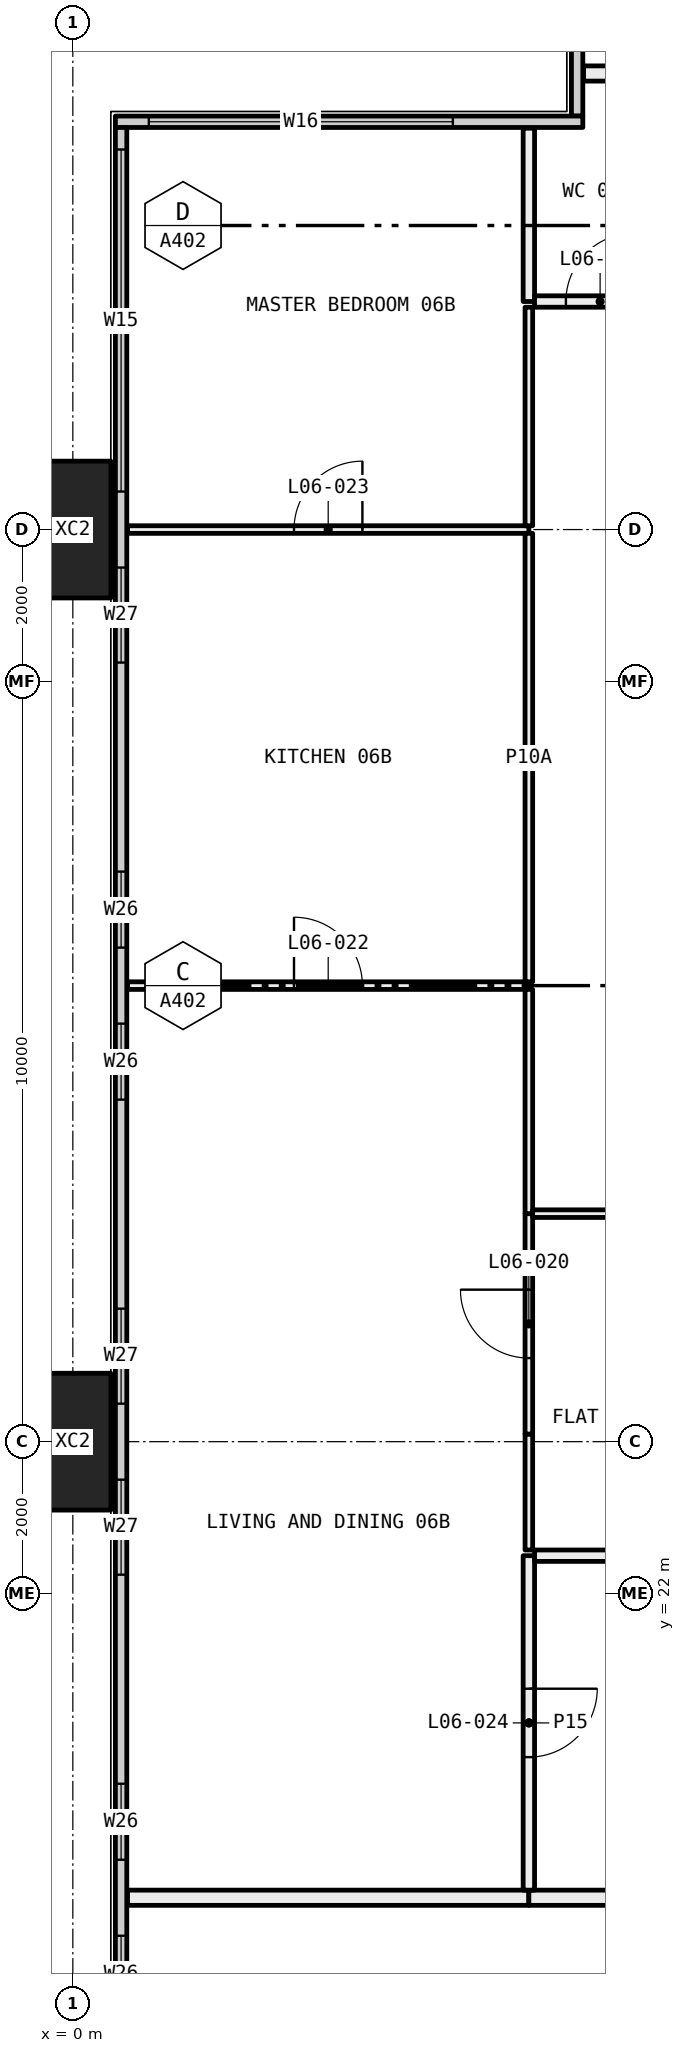
"""IFC4 building model, lengths in metres.
Left out: names, types, materials, properties, quantities, classifications, styles, units other than length and angle.
Written with IfcOpenShell. Run it as: python <this file> out.ifc"""

import sys

from ifc_helpers import new_model, si_unit, direction, frame, frame_2d, origin, origin_2d, place, context, subcontext, project, spatial, rectangle, hollow_rectangle, extrude, element, fill, save


model = new_model("IFC4")
c1 = context("Model", 3, precision=1e-05, world=origin(), true_north=direction((0.0, 1.0)))
c2 = subcontext(c1, "Body", "Model", "MODEL_VIEW")
j1 = project(units=[si_unit("LENGTHUNIT", "METRE"), si_unit("PLANEANGLEUNIT", "RADIAN")], contexts=[c1])
p1 = place(None, origin())
s1 = spatial("IfcSite", under=j1, at=p1, CompositionType="ELEMENT")
p2 = place(p1, origin())
s2 = spatial("IfcBuilding", under=s1, at=p2, CompositionType="ELEMENT")
p3 = place(p2, frame((0.0, 0.0, 33.45)))
s3 = spatial("IfcBuildingStorey", under=s2, at=p3, CompositionType="ELEMENT", Elevation=33.45)
for number, where, z_axis, x_axis in (
    (1, (0.0, 24.0, -0.4), (0.0, 0.0, 1.0), (0.0, 1.0, 0.0)),
    (2, (0.0, 36.0, -0.4), (0.0, 0.0, 1.0), (0.0, 1.0, 0.0)),
):
    element("IfcColumn", number, at=place(p3, frame(where, z_axis=z_axis, x_axis=x_axis)), inside=s3, PredefinedType="COLUMN", context=c2, shape_type="SweptSolid", body=[
        extrude(hollow_rectangle(XDim=1.8, YDim=1.0, WallThickness=0.07, at=origin_2d()), origin(), (0.0, 0.0, 1.0), 3.45),
    ])
p4 = place(p3, frame((6.635, 41.44, 0.0), z_axis=(0.0, 0.0, 1.0), x_axis=(0.0, 1.0, 0.0)))
e3 = element("IfcWall", 3, at=p4, inside=s3, PredefinedType="ELEMENTEDWALL", context=c2, shape_type="SweptSolid", body=[
    extrude(rectangle(XDim=5.85, YDim=0.15, at=frame_2d((2.925, 0.0))), origin(), (0.0, 0.0, 1.0), 3.05),
])
p5 = place(p4, frame((1.56, 0.0, 0.45)))
e4 = element("IfcOpeningElement", 4, at=p5, cuts=e3, PredefinedType="OPENING", context=c2, shape_type="SweptSolid", body=[
    extrude(rectangle(XDim=4.0, YDim=2.55, at=frame_2d((2.0, 1.275))), frame((0.0, 0.085, 0.0), z_axis=(0.0, -1.0, 0.0), x_axis=(1.0, 0.0, 0.0)), (0.0, 0.0, 1.0), 0.17),
])
p6 = place(p3, frame((0.56, 41.365, 0.0), z_axis=(0.0, 0.0, 1.0), x_axis=(1.0, 0.0, 0.0)))
e5 = element("IfcWall", 5, at=p6, inside=s3, PredefinedType="ELEMENTEDWALL", context=c2, shape_type="SweptSolid", body=[
    extrude(rectangle(XDim=6.15, YDim=0.15, at=frame_2d((3.075, 0.0))), origin(), (0.0, 0.0, 1.0), 3.05),
])
p7 = place(p6, frame((0.44, 0.0, 0.45)))
e6 = element("IfcOpeningElement", 6, at=p7, cuts=e5, PredefinedType="OPENING", context=c2, shape_type="SweptSolid", body=[
    extrude(rectangle(XDim=4.0, YDim=2.55, at=frame_2d((2.0, 1.275))), frame((0.0, 0.085, 0.0), z_axis=(0.0, -1.0, 0.0), x_axis=(1.0, 0.0, 0.0)), (0.0, 0.0, 1.0), 0.17),
])
p8 = place(p3, frame((0.635, 6.71, 0.0), z_axis=(0.0, 0.0, 1.0), x_axis=(0.0, 1.0, 0.0)))
e7 = element("IfcWall", 7, at=p8, inside=s3, PredefinedType="ELEMENTEDWALL", context=c2, shape_type="SweptSolid", body=[
    extrude(rectangle(XDim=34.58, YDim=0.15, at=frame_2d((17.29, 0.0))), origin(), (0.0, 0.0, 1.0), 3.05),
])
p9 = place(p8, frame((0.29, 0.0, 0.45)))
e8 = element("IfcOpeningElement", 8, at=p9, cuts=e7, PredefinedType="OPENING", context=c2, shape_type="SweptSolid", body=[
    extrude(rectangle(XDim=4.5, YDim=2.55, at=frame_2d((2.25, 1.275))), frame((0.0, 0.085, 0.0), z_axis=(0.0, -1.0, 0.0), x_axis=(1.0, 0.0, 0.0)), (0.0, 0.0, 1.0), 0.17),
])
p10 = place(p8, frame((5.79, 0.0, 0.45)))
e9 = element("IfcOpeningElement", 9, at=p10, cuts=e7, PredefinedType="OPENING", context=c2, shape_type="SweptSolid", body=[
    extrude(rectangle(XDim=1.25, YDim=2.55, at=frame_2d((0.625, 1.275))), frame((0.0, 0.085, 0.0), z_axis=(0.0, -1.0, 0.0), x_axis=(1.0, 0.0, 0.0)), (0.0, 0.0, 1.0), 0.17),
])
p11 = place(p8, frame((9.79, 0.0, 0.45)))
e10 = element("IfcOpeningElement", 10, at=p11, cuts=e7, PredefinedType="OPENING", context=c2, shape_type="SweptSolid", body=[
    extrude(rectangle(XDim=1.0, YDim=2.55, at=frame_2d((0.5, 1.275))), frame((0.0, 0.085, 0.0), z_axis=(0.0, -1.0, 0.0), x_axis=(1.0, 0.0, 0.0)), (0.0, 0.0, 1.0), 0.17),
])
p12 = place(p8, frame((11.79, 0.0, 0.45)))
e11 = element("IfcOpeningElement", 11, at=p12, cuts=e7, PredefinedType="OPENING", context=c2, shape_type="SweptSolid", body=[
    extrude(rectangle(XDim=1.0, YDim=2.55, at=frame_2d((0.5, 1.275))), frame((0.0, 0.085, 0.0), z_axis=(0.0, -1.0, 0.0), x_axis=(1.0, 0.0, 0.0)), (0.0, 0.0, 1.0), 0.17),
])
p13 = place(p8, frame((15.54, 0.0, 0.45)))
e12 = element("IfcOpeningElement", 12, at=p13, cuts=e7, PredefinedType="OPENING", context=c2, shape_type="SweptSolid", body=[
    extrude(rectangle(XDim=1.25, YDim=2.55, at=frame_2d((0.625, 1.275))), frame((0.0, 0.085, 0.0), z_axis=(0.0, -1.0, 0.0), x_axis=(1.0, 0.0, 0.0)), (0.0, 0.0, 1.0), 0.17),
])
p14 = place(p8, frame((17.79, 0.0, 0.45)))
e13 = element("IfcOpeningElement", 13, at=p14, cuts=e7, PredefinedType="OPENING", context=c2, shape_type="SweptSolid", body=[
    extrude(rectangle(XDim=1.25, YDim=2.55, at=frame_2d((0.625, 1.275))), frame((0.0, 0.085, 0.0), z_axis=(0.0, -1.0, 0.0), x_axis=(1.0, 0.0, 0.0)), (0.0, 0.0, 1.0), 0.17),
])
p15 = place(p8, frame((21.79, 0.0, 0.45)))
e14 = element("IfcOpeningElement", 14, at=p15, cuts=e7, PredefinedType="OPENING", context=c2, shape_type="SweptSolid", body=[
    extrude(rectangle(XDim=1.0, YDim=2.55, at=frame_2d((0.5, 1.275))), frame((0.0, 0.085, 0.0), z_axis=(0.0, -1.0, 0.0), x_axis=(1.0, 0.0, 0.0)), (0.0, 0.0, 1.0), 0.17),
])
p16 = place(p8, frame((23.79, 0.0, 0.45)))
e15 = element("IfcOpeningElement", 15, at=p16, cuts=e7, PredefinedType="OPENING", context=c2, shape_type="SweptSolid", body=[
    extrude(rectangle(XDim=1.0, YDim=2.55, at=frame_2d((0.5, 1.275))), frame((0.0, 0.085, 0.0), z_axis=(0.0, -1.0, 0.0), x_axis=(1.0, 0.0, 0.0)), (0.0, 0.0, 1.0), 0.17),
])
p17 = place(p8, frame((27.54, 0.0, 0.45)))
e16 = element("IfcOpeningElement", 16, at=p17, cuts=e7, PredefinedType="OPENING", context=c2, shape_type="SweptSolid", body=[
    extrude(rectangle(XDim=1.25, YDim=2.55, at=frame_2d((0.625, 1.275))), frame((0.0, 0.085, 0.0), z_axis=(0.0, -1.0, 0.0), x_axis=(1.0, 0.0, 0.0)), (0.0, 0.0, 1.0), 0.17),
])
p18 = place(p8, frame((29.79, 0.0, 0.45)))
e17 = element("IfcOpeningElement", 17, at=p18, cuts=e7, PredefinedType="OPENING", context=c2, shape_type="SweptSolid", body=[
    extrude(rectangle(XDim=4.5, YDim=2.55, at=frame_2d((2.25, 1.275))), frame((0.0, 0.085, 0.0), z_axis=(0.0, -1.0, 0.0), x_axis=(1.0, 0.0, 0.0)), (0.0, 0.0, 1.0), 0.17),
])
p19 = place(p3, frame((6.0, 18.0, 0.0), z_axis=(0.0, 0.0, 1.0), x_axis=(-1.0, 0.0, 0.0)))
e18 = element("IfcWall", 18, at=p19, inside=s3, PredefinedType="PARTITIONING", context=c2, shape_type="SweptSolid", body=[
    extrude(rectangle(XDim=5.28, YDim=0.2, at=frame_2d((2.64, 0.0))), origin(), (0.0, 0.0, 1.0), 3.05),
])
p20 = place(p3, frame((10.1, 18.0, 0.0), z_axis=(0.0, 0.0, 1.0), x_axis=(-1.0, 0.0, 0.0)))
e19 = element("IfcWall", 19, at=p20, inside=s3, PredefinedType="PARTITIONING", context=c2, shape_type="SweptSolid", body=[
    extrude(rectangle(XDim=4.1, YDim=0.2, at=frame_2d((2.05, 0.0))), origin(), (0.0, 0.0, 1.0), 3.05),
])
p21 = place(p3, frame((6.0, 30.0, 0.0), z_axis=(0.0, 0.0, 1.0), x_axis=(-1.0, 0.0, 0.0)))
e20 = element("IfcWall", 20, at=p21, inside=s3, PredefinedType="PARTITIONING", context=c2, shape_type="SweptSolid", body=[
    extrude(rectangle(XDim=5.28, YDim=0.1, at=frame_2d((2.64, 0.0))), origin(), (0.0, 0.0, 1.0), 3.05),
])
p22 = place(p21, frame((2.19, 0.0, 0.0)))
e21 = element("IfcOpeningElement", 21, at=p22, cuts=e20, PredefinedType="OPENING", context=c2, shape_type="SweptSolid", body=[
    extrude(rectangle(XDim=0.9, YDim=2.1, at=frame_2d((0.45, 1.05))), frame((0.0, 0.06, 0.0), z_axis=(0.0, -1.0, 0.0), x_axis=(1.0, 0.0, 0.0)), (0.0, 0.0, 1.0), 0.12),
])
p23 = place(p3, frame((6.0, 18.1, 0.0), z_axis=(0.0, 0.0, 1.0), x_axis=(0.0, 1.0, 0.0)))
e22 = element("IfcWall", 22, at=p23, inside=s3, PredefinedType="PARTITIONING", context=c2, shape_type="SweptSolid", body=[
    extrude(rectangle(XDim=4.4, YDim=0.15, at=frame_2d((2.2, 0.0))), origin(), (0.0, 0.0, 1.0), 3.05),
])
p24 = place(p23, frame((1.75, 0.0, 0.0)))
e23 = element("IfcOpeningElement", 23, at=p24, cuts=e22, PredefinedType="OPENING", context=c2, shape_type="SweptSolid", body=[
    extrude(rectangle(XDim=0.9, YDim=2.1, at=frame_2d((0.45, 1.05))), frame((0.0, 0.085, 0.0), z_axis=(0.0, -1.0, 0.0), x_axis=(1.0, 0.0, 0.0)), (0.0, 0.0, 1.0), 0.17),
])
p25 = place(p3, frame((6.0, 22.575, 0.0), z_axis=(0.0, 0.0, 1.0), x_axis=(0.0, 1.0, 0.0)))
e24 = element("IfcWall", 24, at=p25, inside=s3, PredefinedType="PARTITIONING", context=c2, shape_type="SweptSolid", body=[
    extrude(rectangle(XDim=1.525, YDim=0.1, at=frame_2d((0.763, 0.0))), origin(), (0.0, 0.0, 1.0), 2.45),
])
p26 = place(p3, frame((6.0, 24.1, 0.0), z_axis=(0.0, 0.0, 1.0), x_axis=(0.0, 1.0, 0.0)))
e25 = element("IfcWall", 25, at=p26, inside=s3, PredefinedType="PARTITIONING", context=c2, shape_type="SweptSolid", body=[
    extrude(rectangle(XDim=2.9, YDim=0.1, at=frame_2d((1.45, 0.0))), origin(), (0.0, 0.0, 1.0), 3.05),
])
p27 = place(p26, frame((1.0, 0.0, 0.0)))
e26 = element("IfcOpeningElement", 26, at=p27, cuts=e25, PredefinedType="OPENING", context=c2, shape_type="SweptSolid", body=[
    extrude(rectangle(XDim=0.9, YDim=2.1, at=frame_2d((0.45, 1.05))), frame((0.0, 0.06, 0.0), z_axis=(0.0, -1.0, 0.0), x_axis=(1.0, 0.0, 0.0)), (0.0, 0.0, 1.0), 0.12),
])
p28 = place(p3, frame((6.0, 27.0, 0.0), z_axis=(0.0, 0.0, 1.0), x_axis=(0.0, 1.0, 0.0)))
e27 = element("IfcWall", 27, at=p28, inside=s3, PredefinedType="PARTITIONING", context=c2, shape_type="SweptSolid", body=[
    extrude(rectangle(XDim=2.95, YDim=0.1, at=frame_2d((1.475, 0.0))), origin(), (0.0, 0.0, 1.0), 3.05),
])
p29 = place(p3, frame((6.0, 36.0, 0.0), z_axis=(0.0, 0.0, 1.0), x_axis=(-1.0, 0.0, 0.0)))
e28 = element("IfcWall", 28, at=p29, inside=s3, PredefinedType="PARTITIONING", context=c2, shape_type="SweptSolid", body=[
    extrude(rectangle(XDim=5.28, YDim=0.1, at=frame_2d((2.64, 0.0))), origin(), (0.0, 0.0, 1.0), 2.45),
])
p30 = place(p29, frame((2.19, 0.0, 0.0)))
e29 = element("IfcOpeningElement", 29, at=p30, cuts=e28, PredefinedType="OPENING", context=c2, shape_type="SweptSolid", body=[
    extrude(rectangle(XDim=0.9, YDim=2.1, at=frame_2d((0.45, 1.05))), frame((0.0, 0.06, 0.0), z_axis=(0.0, -1.0, 0.0), x_axis=(1.0, 0.0, 0.0)), (0.0, 0.0, 1.0), 0.12),
])
p31 = place(p3, frame((6.0, 30.05, 0.0), z_axis=(0.0, 0.0, 1.0), x_axis=(0.0, 1.0, 0.0)))
e30 = element("IfcWall", 30, at=p31, inside=s3, PredefinedType="PARTITIONING", context=c2, shape_type="SweptSolid", body=[
    extrude(rectangle(XDim=5.9, YDim=0.1, at=frame_2d((2.95, 0.0))), origin(), (0.0, 0.0, 1.0), 2.45),
])
p32 = place(p3, frame((6.0, 36.05, 0.0), z_axis=(0.0, 0.0, 1.0), x_axis=(0.0, 1.0, 0.0)))
e31 = element("IfcWall", 31, at=p32, inside=s3, PredefinedType="PARTITIONING", context=c2, shape_type="SweptSolid", body=[
    extrude(rectangle(XDim=2.875, YDim=0.1, at=frame_2d((1.438, 0.0))), origin(), (0.0, 0.0, 1.0), 2.45),
])
p33 = place(p3, frame((6.0, 39.0, 0.0), z_axis=(0.0, 0.0, 1.0), x_axis=(0.0, 1.0, 0.0)))
e32 = element("IfcWall", 32, at=p33, inside=s3, PredefinedType="PARTITIONING", context=c2, shape_type="SweptSolid", body=[
    extrude(rectangle(XDim=2.28, YDim=0.15, at=frame_2d((1.14, 0.0))), origin(), (0.0, 0.0, 1.0), 3.05),
])
p34 = place(p3, frame((10.0, 22.5, 0.0), z_axis=(0.0, 0.0, 1.0), x_axis=(-1.0, 0.0, 0.0)))
e33 = element("IfcWall", 33, at=p34, inside=s3, PredefinedType="PARTITIONING", context=c2, shape_type="SweptSolid", body=[
    extrude(rectangle(XDim=3.925, YDim=0.15, at=frame_2d((1.962, 0.0))), origin(), (0.0, 0.0, 1.0), 3.05),
])
p35 = place(p3, frame((10.0, 27.0, 0.0), z_axis=(0.0, 0.0, 1.0), x_axis=(-1.0, 0.0, 0.0)))
e34 = element("IfcWall", 34, at=p35, inside=s3, PredefinedType="PARTITIONING", context=c2, shape_type="SweptSolid", body=[
    extrude(rectangle(XDim=3.95, YDim=0.1, at=frame_2d((1.975, 0.0))), origin(), (0.0, 0.0, 1.0), 3.05),
])
p36 = place(p35, frame((1.525, 0.0, 0.0)))
e35 = element("IfcOpeningElement", 35, at=p36, cuts=e34, PredefinedType="OPENING", context=c2, shape_type="SweptSolid", body=[
    extrude(rectangle(XDim=0.9, YDim=2.1, at=frame_2d((0.45, 1.05))), frame((0.0, 0.06, 0.0), z_axis=(0.0, -1.0, 0.0), x_axis=(1.0, 0.0, 0.0)), (0.0, 0.0, 1.0), 0.12),
])
p37 = place(p3, frame((7.8, 39.0, 0.0), z_axis=(0.0, 0.0, 1.0), x_axis=(-1.0, 0.0, 0.0)))
e36 = element("IfcWall", 36, at=p37, inside=s3, PredefinedType="PARTITIONING", context=c2, shape_type="SweptSolid", body=[
    extrude(rectangle(XDim=1.725, YDim=0.15, at=frame_2d((0.863, 0.0))), origin(), (0.0, 0.0, 1.0), 3.05),
])
p38 = place(p37, frame((0.413, 0.0, 0.0)))
e37 = element("IfcOpeningElement", 37, at=p38, cuts=e36, PredefinedType="OPENING", context=c2, shape_type="SweptSolid", body=[
    extrude(rectangle(XDim=0.9, YDim=2.1, at=frame_2d((0.45, 1.05))), frame((0.0, 0.085, 0.0), z_axis=(0.0, -1.0, 0.0), x_axis=(1.0, 0.0, 0.0)), (0.0, 0.0, 1.0), 0.17),
])
p39 = place(p3, frame((7.8, 42.0, 0.0), z_axis=(0.0, 0.0, 1.0), x_axis=(-1.0, 0.0, 0.0)))
e38 = element("IfcWall", 38, at=p39, inside=s3, PredefinedType="PARTITIONING", context=c2, shape_type="SweptSolid", body=[
    extrude(rectangle(XDim=1.08, YDim=0.2, at=frame_2d((0.54, 0.0))), origin(), (0.0, 0.0, 1.0), 3.05),
])
p40 = place(p7, origin())
e39 = element("IfcWindow", 39, at=p40, inside=s3, PartitioningType="SINGLE_PANEL", PredefinedType="WINDOW", context=c2, shape_type="SweptSolid", body=[
    extrude(rectangle(XDim=4.0, YDim=2.55, at=frame_2d((2.0, 1.275))), frame((0.0, 0.03, 0.0), z_axis=(0.0, -1.0, 0.0), x_axis=(1.0, 0.0, 0.0)), (0.0, 0.0, 1.0), 0.06),
])
fill(e6, e39)
p41 = place(p11, origin())
e40 = element("IfcWindow", 40, at=p41, inside=s3, PartitioningType="SINGLE_PANEL", PredefinedType="WINDOW", context=c2, shape_type="SweptSolid", body=[
    extrude(rectangle(XDim=1.0, YDim=2.55, at=frame_2d((0.5, 1.275))), frame((0.0, 0.03, 0.0), z_axis=(0.0, -1.0, 0.0), x_axis=(1.0, 0.0, 0.0)), (0.0, 0.0, 1.0), 0.06),
])
fill(e10, e40)
p42 = place(p12, origin())
e41 = element("IfcWindow", 41, at=p42, inside=s3, PartitioningType="SINGLE_PANEL", PredefinedType="WINDOW", context=c2, shape_type="SweptSolid", body=[
    extrude(rectangle(XDim=1.0, YDim=2.55, at=frame_2d((0.5, 1.275))), frame((0.0, 0.03, 0.0), z_axis=(0.0, -1.0, 0.0), x_axis=(1.0, 0.0, 0.0)), (0.0, 0.0, 1.0), 0.06),
])
fill(e11, e41)
p43 = place(p13, origin())
e42 = element("IfcWindow", 42, at=p43, inside=s3, PartitioningType="SINGLE_PANEL", PredefinedType="WINDOW", context=c2, shape_type="SweptSolid", body=[
    extrude(rectangle(XDim=1.25, YDim=2.55, at=frame_2d((0.625, 1.275))), frame((0.0, 0.03, 0.0), z_axis=(0.0, -1.0, 0.0), x_axis=(1.0, 0.0, 0.0)), (0.0, 0.0, 1.0), 0.06),
])
fill(e12, e42)
p44 = place(p14, origin())
e43 = element("IfcWindow", 43, at=p44, inside=s3, PartitioningType="SINGLE_PANEL", PredefinedType="WINDOW", context=c2, shape_type="SweptSolid", body=[
    extrude(rectangle(XDim=1.25, YDim=2.55, at=frame_2d((0.625, 1.275))), frame((0.0, 0.03, 0.0), z_axis=(0.0, -1.0, 0.0), x_axis=(1.0, 0.0, 0.0)), (0.0, 0.0, 1.0), 0.06),
])
fill(e13, e43)
p45 = place(p15, origin())
e44 = element("IfcWindow", 44, at=p45, inside=s3, PartitioningType="SINGLE_PANEL", PredefinedType="WINDOW", context=c2, shape_type="SweptSolid", body=[
    extrude(rectangle(XDim=1.0, YDim=2.55, at=frame_2d((0.5, 1.275))), frame((0.0, 0.03, 0.0), z_axis=(0.0, -1.0, 0.0), x_axis=(1.0, 0.0, 0.0)), (0.0, 0.0, 1.0), 0.06),
])
fill(e14, e44)
p46 = place(p16, origin())
e45 = element("IfcWindow", 45, at=p46, inside=s3, PartitioningType="SINGLE_PANEL", PredefinedType="WINDOW", context=c2, shape_type="SweptSolid", body=[
    extrude(rectangle(XDim=1.0, YDim=2.55, at=frame_2d((0.5, 1.275))), frame((0.0, 0.03, 0.0), z_axis=(0.0, -1.0, 0.0), x_axis=(1.0, 0.0, 0.0)), (0.0, 0.0, 1.0), 0.06),
])
fill(e15, e45)
p47 = place(p17, origin())
e46 = element("IfcWindow", 46, at=p47, inside=s3, PartitioningType="SINGLE_PANEL", PredefinedType="WINDOW", context=c2, shape_type="SweptSolid", body=[
    extrude(rectangle(XDim=1.25, YDim=2.55, at=frame_2d((0.625, 1.275))), frame((0.0, 0.03, 0.0), z_axis=(0.0, -1.0, 0.0), x_axis=(1.0, 0.0, 0.0)), (0.0, 0.0, 1.0), 0.06),
])
fill(e16, e46)
p48 = place(p18, origin())
e47 = element("IfcWindow", 47, at=p48, inside=s3, PartitioningType="SINGLE_PANEL", PredefinedType="WINDOW", context=c2, shape_type="SweptSolid", body=[
    extrude(rectangle(XDim=4.5, YDim=2.55, at=frame_2d((2.25, 1.275))), frame((0.0, 0.03, 0.0), z_axis=(0.0, -1.0, 0.0), x_axis=(1.0, 0.0, 0.0)), (0.0, 0.0, 1.0), 0.06),
])
fill(e17, e47)
p49 = place(p27, origin())
e48 = element("IfcDoor", 48, at=p49, inside=s3, OperationType="SINGLE_SWING_LEFT", PredefinedType="DOOR", context=c2, shape_type="SweptSolid", body=[
    extrude(rectangle(XDim=0.9, YDim=2.1, at=frame_2d((0.45, 1.05))), frame((0.0, 0.025, 0.0), z_axis=(0.0, -1.0, 0.0), x_axis=(1.0, 0.0, 0.0)), (0.0, 0.0, 1.0), 0.05),
])
fill(e26, e48)
p50 = place(p22, frame((0.9, 0.0, 0.0), x_axis=(-1.0, 0.0, 0.0)))
e49 = element("IfcDoor", 49, at=p50, inside=s3, OperationType="SINGLE_SWING_RIGHT", PredefinedType="DOOR", context=c2, shape_type="SweptSolid", body=[
    extrude(rectangle(XDim=0.9, YDim=2.1, at=frame_2d((0.45, 1.05))), frame((0.0, 0.025, 0.0), z_axis=(0.0, -1.0, 0.0), x_axis=(1.0, 0.0, 0.0)), (0.0, 0.0, 1.0), 0.05),
])
fill(e21, e49)
p51 = place(p30, frame((0.9, 0.0, 0.0), x_axis=(-1.0, 0.0, 0.0)))
e50 = element("IfcDoor", 50, at=p51, inside=s3, OperationType="SINGLE_SWING_LEFT", PredefinedType="DOOR", context=c2, shape_type="SweptSolid", body=[
    extrude(rectangle(XDim=0.9, YDim=2.1, at=frame_2d((0.45, 1.05))), frame((0.0, 0.025, 0.0), z_axis=(0.0, -1.0, 0.0), x_axis=(1.0, 0.0, 0.0)), (0.0, 0.0, 1.0), 0.05),
])
fill(e29, e50)
p52 = place(p24, frame((0.9, 0.0, 0.0), x_axis=(-1.0, 0.0, 0.0)))
e51 = element("IfcDoor", 51, at=p52, inside=s3, OperationType="SINGLE_SWING_RIGHT", PredefinedType="DOOR", context=c2, shape_type="SweptSolid", body=[
    extrude(rectangle(XDim=0.9, YDim=2.1, at=frame_2d((0.45, 1.05))), frame((0.0, 0.025, 0.0), z_axis=(0.0, -1.0, 0.0), x_axis=(1.0, 0.0, 0.0)), (0.0, 0.0, 1.0), 0.05),
])
fill(e23, e51)
p53 = place(p38, frame((0.9, 0.0, 0.0), x_axis=(-1.0, 0.0, 0.0)))
e52 = element("IfcDoor", 52, at=p53, inside=s3, OperationType="SINGLE_SWING_LEFT", PredefinedType="DOOR", context=c2, shape_type="SweptSolid", body=[
    extrude(rectangle(XDim=0.9, YDim=2.1, at=frame_2d((0.45, 1.05))), frame((0.0, 0.025, 0.0), z_axis=(0.0, -1.0, 0.0), x_axis=(1.0, 0.0, 0.0)), (0.0, 0.0, 1.0), 0.05),
])
fill(e37, e52)
save(model, sys.argv[1])
